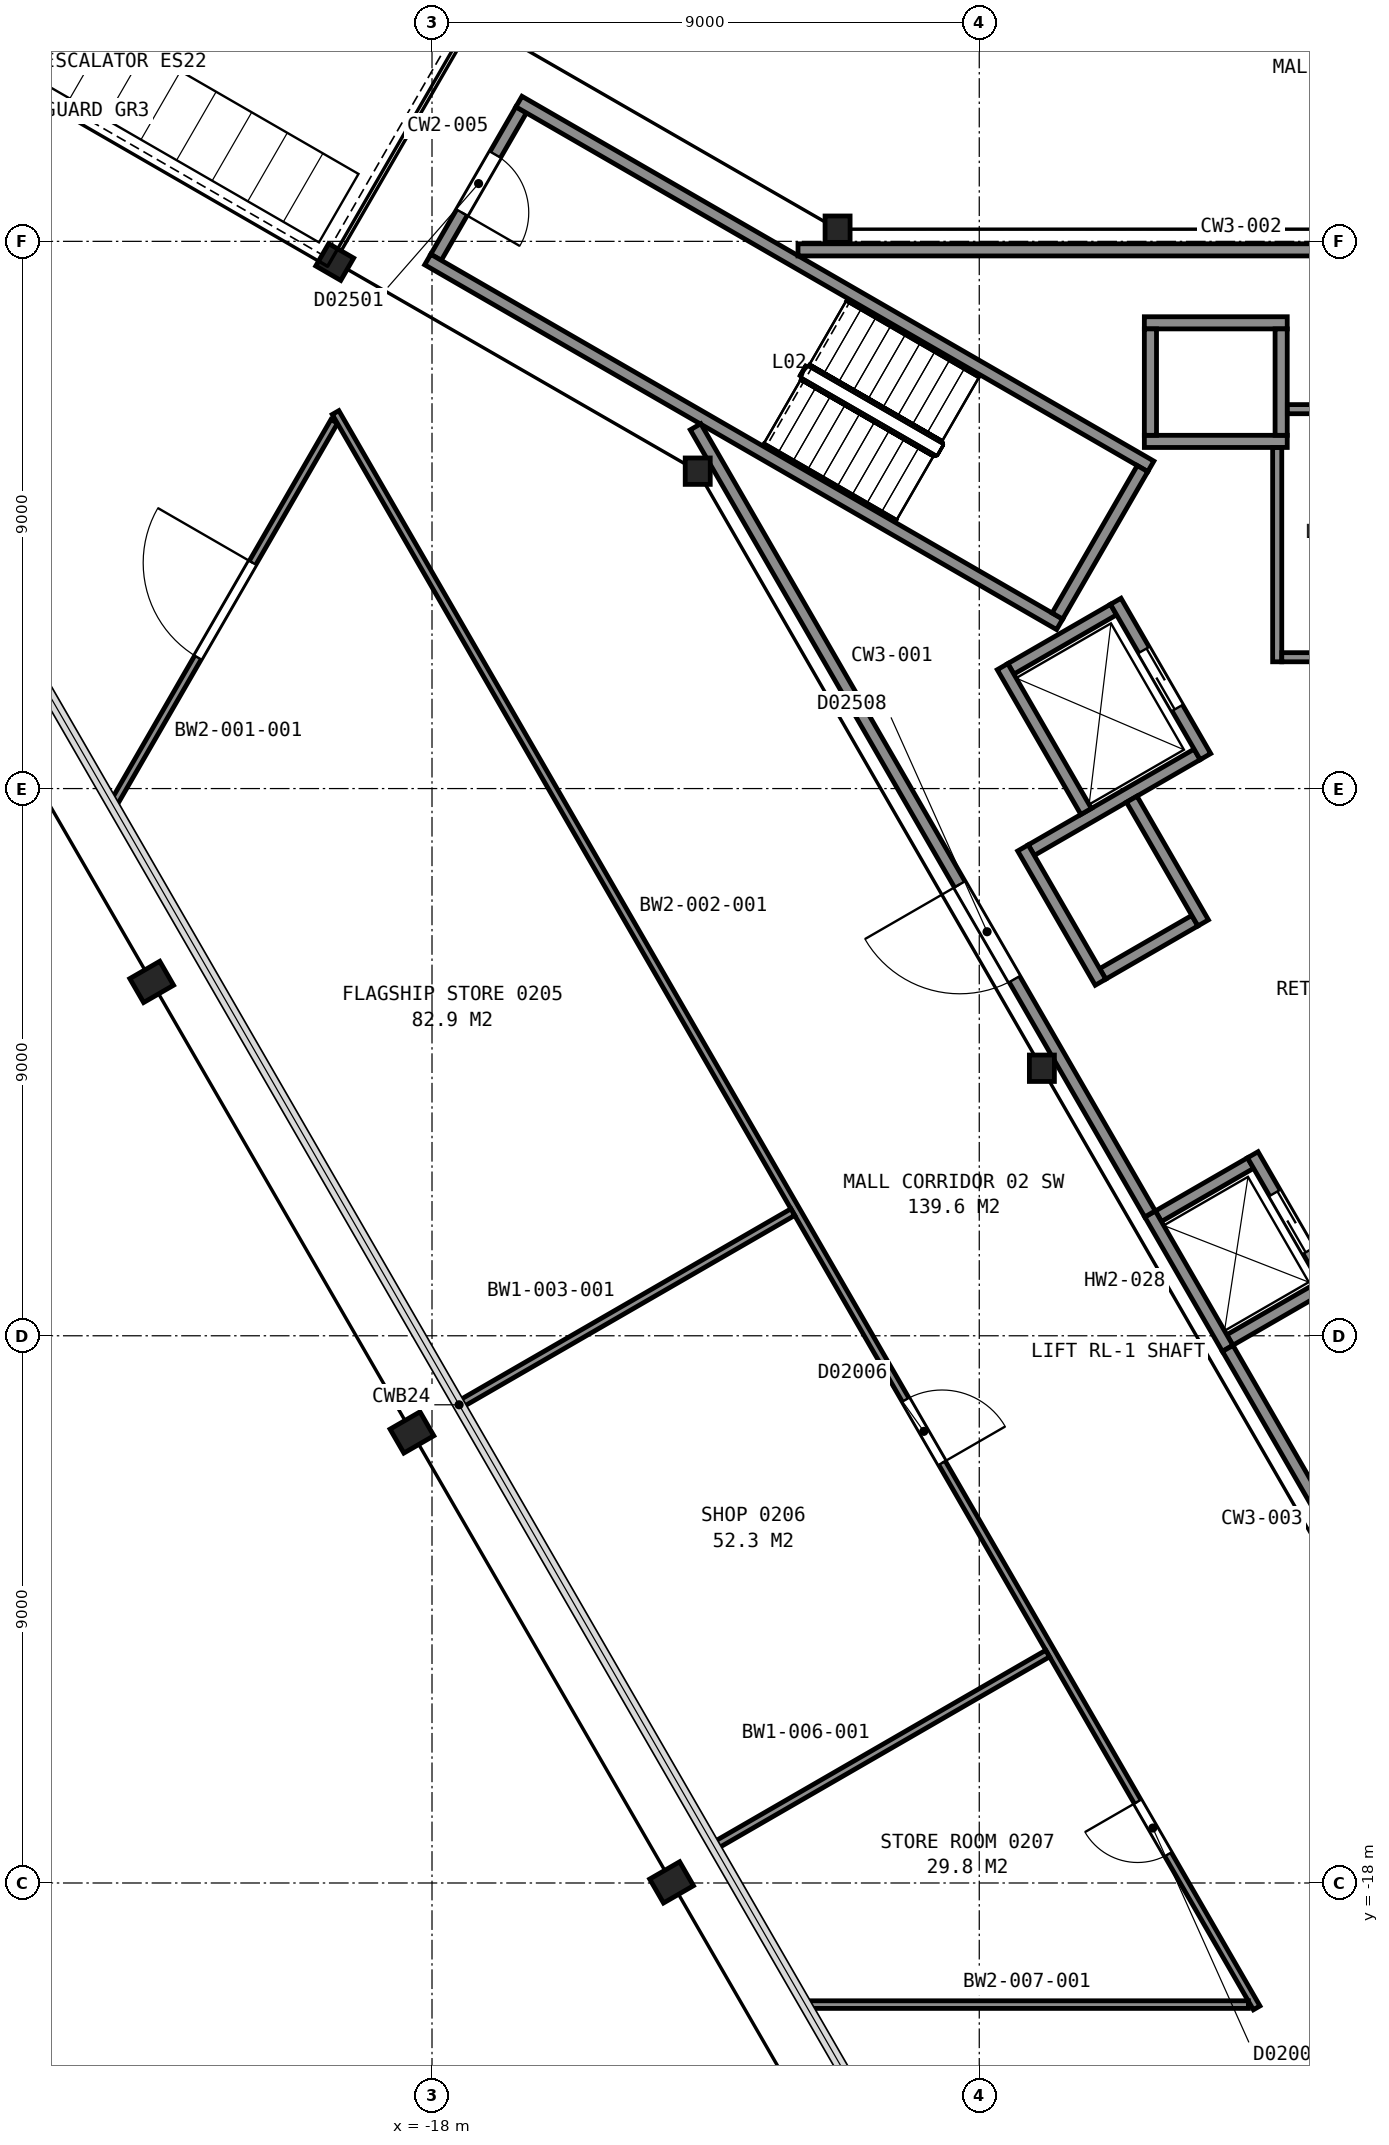
"""IFC4 building model, lengths in metres.
Left out: names, types, materials, properties, quantities, classifications, styles, units other than length and angle.
Written with IfcOpenShell. Run it as: python <this file> out.ifc"""

import sys

from ifc_helpers import new_model, si_unit, direction, frame, frame_2d, origin, origin_2d, place, context, subcontext, project, spatial, rectangle, i_section, extrude, element, fill, save


model = new_model("IFC4")
c1 = context("Model", 3, precision=1e-05, world=origin(), true_north=direction((0.0, 1.0)))
c2 = subcontext(c1, "Body", "Model", "MODEL_VIEW")
j1 = project(units=[si_unit("LENGTHUNIT", "METRE"), si_unit("PLANEANGLEUNIT", "RADIAN")], contexts=[c1])
p1 = place(None, origin())
s1 = spatial("IfcSite", under=j1, at=p1, CompositionType="ELEMENT")
p2 = place(p1, origin())
s2 = spatial("IfcBuilding", under=s1, at=p2, CompositionType="ELEMENT")
p3 = place(p2, frame((0.0, 0.0, 17.4)))
s3 = spatial("IfcBuildingStorey", under=s2, at=p3, CompositionType="ELEMENT", Elevation=17.4)
for number, where, z_axis, x_axis in (
    (1, (-22.61, -3.18, -0.16), (0.0, 0.0, 1.0), (-0.5, 0.866, 0.0)),
    (2, (-18.33, -10.59, -0.16), (0.0, 0.0, 1.0), (-0.5, 0.866, 0.0)),
    (3, (-14.06, -17.99, -0.16), (0.0, 0.0, 1.0), (-0.5, 0.866, 0.0)),
):
    element("IfcColumn", number, at=place(p3, frame(where, z_axis=z_axis, x_axis=x_axis)), inside=s3, PredefinedType="COLUMN", context=c2, shape_type="SweptSolid", body=[
        extrude(i_section(OverallWidth=0.455, OverallDepth=0.569, WebThickness=0.078, FlangeThickness=0.125, FilletRadius=0.015, at=origin_2d()), origin(), (0.0, 0.0, 1.0), 5.16),
    ])
p4 = place(p3, frame((-11.33, 9.2, 0.0), z_axis=(0.0, 0.0, 1.0), x_axis=(1.0, 0.0, 0.0)))
e4 = element("IfcColumn", 4, at=p4, inside=s3, PredefinedType="COLUMN", context=c2, shape_type="SweptSolid", body=[
    extrude(i_section(OverallWidth=0.411, OverallDepth=0.434, WebThickness=0.036, FlangeThickness=0.057, FilletRadius=0.015, at=origin_2d()), origin(), (0.0, 0.0, 1.0), 5.0),
])
p5 = place(p3, frame((-19.6, 8.66, 0.0), z_axis=(0.0, 0.0, 1.0), x_axis=(0.5, 0.866025403784, 0.0)))
e5 = element("IfcColumn", 5, at=p5, inside=s3, PredefinedType="COLUMN", context=c2, shape_type="SweptSolid", body=[
    extrude(i_section(OverallWidth=0.424, OverallDepth=0.475, WebThickness=0.048, FlangeThickness=0.077, FilletRadius=0.015, at=origin_2d()), origin(), (0.0, 0.0, 1.0), 5.0),
])
for number, where, z_axis, x_axis in (
    (6, (-13.63, 5.22, 0.0), (0.0, 0.0, 1.0), (1.0, 0.0, 0.0)),
    (7, (-7.97, -4.6, 0.0), (0.0, 0.0, 1.0), (1.0, 0.0, 0.0)),
):
    element("IfcColumn", number, at=place(p3, frame(where, z_axis=z_axis, x_axis=x_axis)), inside=s3, PredefinedType="COLUMN", context=c2, shape_type="SweptSolid", body=[
        extrude(i_section(OverallWidth=0.411, OverallDepth=0.434, WebThickness=0.036, FlangeThickness=0.057, FilletRadius=0.015, at=origin_2d()), origin(), (0.0, 0.0, 1.0), 5.0),
    ])
p6 = place(p3, frame((-16.534, 11.162, 0.0), z_axis=(0.0, 0.0, 1.0), x_axis=(-0.49998411664, -0.866034573852, 0.0)))
e8 = element("IfcWall", 8, at=p6, inside=s3, PredefinedType="PARTITIONING", context=c2, shape_type="SweptSolid", body=[
    extrude(rectangle(XDim=2.8, YDim=0.2, at=frame_2d((1.4, 0.0))), origin(), (0.0, 0.0, 1.0), 4.75),
])
p7 = place(p6, frame((0.85, 0.0, 0.0)))
e9 = element("IfcOpeningElement", 9, at=p7, cuts=e8, PredefinedType="OPENING", context=c2, shape_type="SweptSolid", body=[
    extrude(rectangle(XDim=1.1, YDim=2.1, at=frame_2d((0.55, 1.05))), frame((0.0, 0.11, 0.0), z_axis=(0.0, -1.0, 0.0), x_axis=(1.0, 0.0, 0.0)), (0.0, 0.0, 1.0), 0.22),
])
for number, where, z_axis, x_axis in (
    (10, (-7.678, 2.701, 0.0), (0.0, 0.0, 1.0), (-0.866, 0.5, 0.0)),
    (11, (-6.178, 5.299, 0.0), (0.0, 0.0, 1.0), (-0.866, 0.5, 0.0)),
):
    element("IfcWall", number, at=place(p3, frame(where, z_axis=z_axis, x_axis=x_axis)), inside=s3, PredefinedType="PARTITIONING", context=c2, shape_type="SweptSolid", body=[
        extrude(rectangle(XDim=12.0, YDim=0.2, at=frame_2d((6.0, 0.0))), origin(), (0.0, 0.0, 1.0), 4.75),
    ])
p8 = place(p3, frame((-6.315, 5.262, 0.0), z_axis=(0.0, 0.0, 1.0), x_axis=(-0.500049511043, -0.865996816683, 0.0)))
e12 = element("IfcWall", 12, at=p8, inside=s3, PredefinedType="PARTITIONING", context=c2, shape_type="SweptSolid", body=[
    extrude(rectangle(XDim=2.8, YDim=0.2, at=frame_2d((1.4, 0.0))), origin(), (0.0, 0.0, 1.0), 4.75),
])
for number, where, z_axis, x_axis in (
    (13, (-6.285, 5.71, 0.0), (0.0, 0.0, 1.0), (1.0, 0.0, 0.0)),
    (14, (-6.285, 7.66, 0.0), (0.0, 0.0, 1.0), (1.0, 0.0, 0.0)),
):
    element("IfcWall", number, at=place(p3, frame(where, z_axis=z_axis, x_axis=x_axis)), inside=s3, PredefinedType="PARTITIONING", context=c2, shape_type="SweptSolid", body=[
        extrude(rectangle(XDim=2.35, YDim=0.2, at=frame_2d((1.175, 0.0))), origin(), (0.0, 0.0, 1.0), 5.0),
    ])
for number, where, z_axis, x_axis in (
    (15, (-4.879, -9.07, 0.0), (0.0, 0.0, 1.0), (0.866, 0.5, 0.0)),
    (16, (-6.054, -7.034, 0.0), (0.0, 0.0, 1.0), (0.866, 0.5, 0.0)),
    (17, (-6.97, -3.048, 0.0), (0.0, 0.0, 1.0), (0.866, 0.5, 0.0)),
):
    element("IfcWall", number, at=place(p3, frame(where, z_axis=z_axis, x_axis=x_axis)), inside=s3, PredefinedType="PARTITIONING", context=c2, shape_type="SweptSolid", body=[
        extrude(rectangle(XDim=1.75, YDim=0.2, at=frame_2d((0.875, 0.0))), origin(), (0.0, 0.0, 1.0), 5.0),
    ])
p9 = place(p3, frame((-8.145, -1.013, 0.0), z_axis=(0.0, 0.0, 1.0), x_axis=(0.866016494683, 0.500015430699, 0.0)))
e18 = element("IfcWall", 18, at=p9, inside=s3, PredefinedType="PARTITIONING", context=c2, shape_type="SweptSolid", body=[
    extrude(rectangle(XDim=3.15, YDim=0.2, at=frame_2d((1.575, 0.0))), origin(), (0.0, 0.0, 1.0), 5.0),
])
p10 = place(p3, frame((-8.48, 1.969, 0.0), z_axis=(0.0, 0.0, 1.0), x_axis=(0.866000020948, 0.500043961785, 0.0)))
e19 = element("IfcWall", 19, at=p10, inside=s3, PredefinedType="PARTITIONING", context=c2, shape_type="SweptSolid", body=[
    extrude(rectangle(XDim=1.95, YDim=0.2, at=frame_2d((0.975, 0.0))), origin(), (0.0, 0.0, 1.0), 5.0),
])
for number, where, z_axis, x_axis in (
    (20, (-4.035, 5.81, 0.0), (0.0, 0.0, 1.0), (0.0, 1.0, 0.0)),
    (21, (-6.185, 5.81, 0.0), (0.0, 0.0, 1.0), (0.0, 1.0, 0.0)),
):
    element("IfcWall", number, at=place(p3, frame(where, z_axis=z_axis, x_axis=x_axis)), inside=s3, PredefinedType="PARTITIONING", context=c2, shape_type="SweptSolid", body=[
        extrude(rectangle(XDim=1.75, YDim=0.2, at=frame_2d((0.875, 0.0))), origin(), (0.0, 0.0, 1.0), 5.0),
    ])
p11 = place(p3, frame((-5.28, 0.525, 0.0), z_axis=(0.0, 0.0, 1.0), x_axis=(-0.500037662692, 0.866003658127, 0.0)))
e22 = element("IfcWall", 22, at=p11, inside=s3, PredefinedType="PARTITIONING", context=c2, shape_type="SweptSolid", body=[
    extrude(rectangle(XDim=2.95, YDim=0.2, at=frame_2d((1.475, 0.0))), origin(), (0.0, 0.0, 1.0), 5.0),
])
p12 = place(p11, frame((0.925, 0.0, 0.0)))
e23 = element("IfcOpeningElement", 23, at=p12, cuts=e22, PredefinedType="OPENING", context=c2, shape_type="SweptSolid", body=[
    extrude(rectangle(XDim=1.1, YDim=2.1, at=frame_2d((0.55, 1.05))), frame((0.0, 0.11, 0.0), z_axis=(0.0, -1.0, 0.0), x_axis=(1.0, 0.0, 0.0)), (0.0, 0.0, 1.0), 0.22),
])
p13 = place(p3, frame((-5.318, -2.21, 0.0), z_axis=(0.0, 0.0, 1.0), x_axis=(-0.499938297808, 0.866061024631, 0.0)))
e24 = element("IfcWall", 24, at=p13, inside=s3, PredefinedType="PARTITIONING", context=c2, shape_type="SweptSolid", body=[
    extrude(rectangle(XDim=2.35, YDim=0.2, at=frame_2d((1.175, 0.0))), origin(), (0.0, 0.0, 1.0), 5.0),
])
p14 = place(p3, frame((-7.242, -0.376, 0.0), z_axis=(0.0, 0.0, 1.0), x_axis=(-0.499996545922, 0.866027397988, 0.0)))
e25 = element("IfcWall", 25, at=p14, inside=s3, PredefinedType="PARTITIONING", context=c2, shape_type="SweptSolid", body=[
    extrude(rectangle(XDim=2.75, YDim=0.2, at=frame_2d((1.375, 0.0))), origin(), (0.0, 0.0, 1.0), 5.0),
])
p15 = place(p3, frame((-3.227, -8.231, 0.0), z_axis=(0.0, 0.0, 1.0), x_axis=(-0.499948979701, 0.866054858364, 0.0)))
e26 = element("IfcWall", 26, at=p15, inside=s3, PredefinedType="PARTITIONING", context=c2, shape_type="SweptSolid", body=[
    extrude(rectangle(XDim=2.55, YDim=0.2, at=frame_2d((1.275, 0.0))), origin(), (0.0, 0.0, 1.0), 5.0),
])
p16 = place(p15, frame((0.725, 0.0, 0.0)))
e27 = element("IfcOpeningElement", 27, at=p16, cuts=e26, PredefinedType="OPENING", context=c2, shape_type="SweptSolid", body=[
    extrude(rectangle(XDim=1.1, YDim=2.1, at=frame_2d((0.55, 1.05))), frame((0.0, 0.11, 0.0), z_axis=(0.0, -1.0, 0.0), x_axis=(1.0, 0.0, 0.0)), (0.0, 0.0, 1.0), 0.22),
])
for number, where, z_axis, x_axis in (
    (28, (-7.006, -3.185, 0.0), (0.0, 0.0, 1.0), (-0.5, 0.866, 0.0)),
    (29, (-4.916, -9.206, 0.0), (0.0, 0.0, 1.0), (-0.5, 0.866, 0.0)),
):
    element("IfcWall", number, at=place(p3, frame(where, z_axis=z_axis, x_axis=x_axis)), inside=s3, PredefinedType="PARTITIONING", context=c2, shape_type="SweptSolid", body=[
        extrude(rectangle(XDim=2.55, YDim=0.2, at=frame_2d((1.275, 0.0))), origin(), (0.0, 0.0, 1.0), 5.0),
    ])
p17 = place(p3, frame((-13.666, 5.95, 0.0), z_axis=(0.0, 0.0, 1.0), x_axis=(0.499971736997, -0.866041720822, 0.0)))
e30 = element("IfcWall", 30, at=p17, inside=s3, PredefinedType="PARTITIONING", context=c2, shape_type="SweptSolid", body=[
    extrude(rectangle(XDim=14.949, YDim=0.2, at=frame_2d((7.475, 0.0))), origin(), (0.0, 0.0, 1.0), 4.75),
])
p18 = place(p17, frame((8.69, 0.0, 0.0)))
e31 = element("IfcOpeningElement", 31, at=p18, cuts=e30, PredefinedType="OPENING", context=c2, shape_type="SweptSolid", body=[
    extrude(rectangle(XDim=1.8, YDim=2.1, at=frame_2d((0.9, 1.05))), frame((0.0, 0.11, 0.0), z_axis=(0.0, -1.0, 0.0), x_axis=(1.0, 0.0, 0.0)), (0.0, 0.0, 1.0), 0.22),
])
p19 = place(p3, frame((11.986, 8.86, 0.0), z_axis=(0.0, 0.0, 1.0), x_axis=(-1.0, 0.0, 0.0)))
e32 = element("IfcWall", 32, at=p19, inside=s3, PredefinedType="PARTITIONING", context=c2, shape_type="SweptSolid", body=[
    extrude(rectangle(XDim=23.967, YDim=0.2, at=frame_2d((11.983, 0.0))), origin(), (0.0, 0.0, 1.0), 4.75),
])
p20 = place(p19, frame((7.596, 0.0, 0.0)))
e33 = element("IfcOpeningElement", 33, at=p20, cuts=e32, PredefinedType="OPENING", context=c2, shape_type="SweptSolid", body=[
    extrude(rectangle(XDim=1.8, YDim=2.1, at=frame_2d((0.9, 1.05))), frame((0.0, 0.11, 0.0), z_axis=(0.0, -1.0, 0.0), x_axis=(1.0, 0.0, 0.0)), (0.0, 0.0, 1.0), 0.22),
])
p21 = place(p3, frame((-4.914, -9.208, 0.0), z_axis=(0.0, 0.0, 1.0), x_axis=(0.499947703927, -0.866055594831, 0.0)))
e34 = element("IfcWall", 34, at=p21, inside=s3, PredefinedType="PARTITIONING", context=c2, shape_type="SweptSolid", body=[
    extrude(rectangle(XDim=6.474, YDim=0.2, at=frame_2d((3.237, 0.0))), origin(), (0.0, 0.0, 1.0), 4.75),
])
p22 = place(p3, frame((-4.1, 2.085, 0.0), z_axis=(0.0, 0.0, 1.0), x_axis=(0.0, 1.0, 0.0)))
e35 = element("IfcWall", 35, at=p22, inside=s3, PredefinedType="PARTITIONING", context=c2, shape_type="SweptSolid", body=[
    extrude(rectangle(XDim=3.523, YDim=0.15, at=frame_2d((1.761, 0.0))), origin(), (0.0, 0.0, 1.0), 4.75),
])
p23 = place(p3, frame((-4.025, 2.16, 0.0), z_axis=(0.0, 0.0, 1.0), x_axis=(1.0, 0.0, 0.0)))
e36 = element("IfcWall", 36, at=p23, inside=s3, PredefinedType="PARTITIONING", context=c2, shape_type="SweptSolid", body=[
    extrude(rectangle(XDim=1.238, YDim=0.15, at=frame_2d((0.619, 0.0))), origin(), (0.0, 0.0, 1.0), 4.75),
])
p24 = place(p3, frame((-3.933, 6.24, 0.0), z_axis=(0.0, 0.0, 1.0), x_axis=(1.0, 0.0, 0.0)))
e37 = element("IfcWall", 37, at=p24, inside=s3, PredefinedType="PARTITIONING", context=c2, shape_type="SweptSolid", body=[
    extrude(rectangle(XDim=3.538, YDim=0.15, at=frame_2d((1.769, 0.0))), origin(), (0.0, 0.0, 1.0), 4.75),
])
p25 = place(p24, frame((0.4, 0.0, 0.0)))
e38 = element("IfcOpeningElement", 38, at=p25, cuts=e37, PredefinedType="OPENING", context=c2, shape_type="SweptSolid", body=[
    extrude(rectangle(XDim=1.0, YDim=2.1, at=frame_2d((0.5, 1.05))), frame((0.0, 0.085, 0.0), z_axis=(0.0, -1.0, 0.0), x_axis=(1.0, 0.0, 0.0)), (0.0, 0.0, 1.0), 0.17),
])
p26 = place(p3, frame((-19.607, 6.039, 0.0), z_axis=(0.0, 0.0, 1.0), x_axis=(-0.500002873931, -0.866023744513, 0.0)))
e39 = element("IfcWall", 39, at=p26, inside=s3, PredefinedType="PARTITIONING", context=c2, shape_type="SweptSolid", body=[
    extrude(rectangle(XDim=7.285, YDim=0.125, at=frame_2d((3.643, 0.0))), origin(), (0.0, 0.0, 1.0), 4.84),
])
p27 = place(p26, frame((2.685, 0.0, 0.0)))
e40 = element("IfcOpeningElement", 40, at=p27, cuts=e39, PredefinedType="OPENING", context=c2, shape_type="SweptSolid", body=[
    extrude(rectangle(XDim=1.8, YDim=2.4, at=frame_2d((0.9, 1.2))), frame((0.0, 0.073, 0.0), z_axis=(0.0, -1.0, 0.0), x_axis=(1.0, 0.0, 0.0)), (0.0, 0.0, 1.0), 0.145),
])
p28 = place(p3, frame((-4.438, -20.054, 0.0), z_axis=(0.0, 0.0, 1.0), x_axis=(-0.499994028088, 0.866028851642, 0.0)))
e41 = element("IfcWall", 41, at=p28, inside=s3, PredefinedType="PARTITIONING", context=c2, shape_type="SweptSolid", body=[
    extrude(rectangle(XDim=30.297, YDim=0.125, at=frame_2d((15.148, 0.0))), origin(), (0.0, 0.0, 1.0), 3.853),
])
p29 = place(p28, frame((10.349, 0.0, 0.0)))
e42 = element("IfcOpeningElement", 42, at=p29, cuts=e41, PredefinedType="OPENING", context=c2, shape_type="SweptSolid", body=[
    extrude(rectangle(XDim=1.2, YDim=2.1, at=frame_2d((0.6, 1.05))), frame((0.0, 0.073, 0.0), z_axis=(0.0, -1.0, 0.0), x_axis=(1.0, 0.0, 0.0)), (0.0, 0.0, 1.0), 0.145),
])
p30 = place(p28, frame((2.916, 0.0, 0.0)))
e43 = element("IfcOpeningElement", 43, at=p30, cuts=e41, PredefinedType="OPENING", context=c2, shape_type="SweptSolid", body=[
    extrude(rectangle(XDim=1.0, YDim=2.1, at=frame_2d((0.5, 1.05))), frame((0.0, 0.073, 0.0), z_axis=(0.0, -1.0, 0.0), x_axis=(1.0, 0.0, 0.0)), (0.0, 0.0, 1.0), 0.145),
])
for number, where, z_axis, x_axis in (
    (44, (-17.554, -10.135, 0.0), (0.0, 0.0, 1.0), (0.866, 0.5, 0.0)),
    (45, (-13.363, -17.395, 0.0), (0.0, 0.0, 1.0), (0.866, 0.5, 0.0)),
):
    element("IfcWall", number, at=place(p3, frame(where, z_axis=z_axis, x_axis=x_axis)), inside=s3, PredefinedType="PARTITIONING", context=c2, shape_type="SweptSolid", body=[
        extrude(rectangle(XDim=6.337, YDim=0.125, at=frame_2d((3.168, 0.0))), origin(), (0.0, 0.0, 1.0), 3.853),
    ])
p31 = place(p3, frame((-11.859, -20.0, 0.0), z_axis=(0.0, 0.0, 1.0), x_axis=(1.0, 0.0, 0.0)))
e46 = element("IfcWall", 46, at=p31, inside=s3, PredefinedType="PARTITIONING", context=c2, shape_type="SweptSolid", body=[
    extrude(rectangle(XDim=7.285, YDim=0.125, at=frame_2d((3.643, 0.0))), origin(), (0.0, 0.0, 1.0), 4.84),
])
p32 = place(p7, origin())
e47 = element("IfcDoor", 47, at=p32, inside=s3, OperationType="SINGLE_SWING_RIGHT", PredefinedType="DOOR", context=c2, shape_type="SweptSolid", body=[
    extrude(rectangle(XDim=1.1, YDim=2.1, at=frame_2d((0.55, 1.05))), frame((0.0, 0.025, 0.0), z_axis=(0.0, -1.0, 0.0), x_axis=(1.0, 0.0, 0.0)), (0.0, 0.0, 1.0), 0.05),
])
fill(e9, e47)
p33 = place(p12, origin())
e48 = element("IfcDoor", 48, at=p33, inside=s3, OperationType="SLIDING_TO_LEFT", PredefinedType="DOOR", context=c2, shape_type="SweptSolid", body=[
    extrude(rectangle(XDim=1.1, YDim=2.1, at=frame_2d((0.55, 1.05))), frame((0.0, 0.025, 0.0), z_axis=(0.0, -1.0, 0.0), x_axis=(1.0, 0.0, 0.0)), (0.0, 0.0, 1.0), 0.05),
])
fill(e23, e48)
p34 = place(p16, origin())
e49 = element("IfcDoor", 49, at=p34, inside=s3, OperationType="SLIDING_TO_LEFT", PredefinedType="DOOR", context=c2, shape_type="SweptSolid", body=[
    extrude(rectangle(XDim=1.1, YDim=2.1, at=frame_2d((0.55, 1.05))), frame((0.0, 0.025, 0.0), z_axis=(0.0, -1.0, 0.0), x_axis=(1.0, 0.0, 0.0)), (0.0, 0.0, 1.0), 0.05),
])
fill(e27, e49)
p35 = place(p18, origin())
e50 = element("IfcDoor", 50, at=p35, inside=s3, OperationType="DOUBLE_DOOR_SINGLE_SWING", PredefinedType="DOOR", context=c2, shape_type="SweptSolid", body=[
    extrude(rectangle(XDim=1.8, YDim=2.1, at=frame_2d((0.9, 1.05))), frame((0.0, 0.025, 0.0), z_axis=(0.0, -1.0, 0.0), x_axis=(1.0, 0.0, 0.0)), (0.0, 0.0, 1.0), 0.05),
])
fill(e31, e50)
p36 = place(p27, origin())
e51 = element("IfcDoor", 51, at=p36, inside=s3, OperationType="DOUBLE_DOOR_SINGLE_SWING", PredefinedType="DOOR", context=c2, shape_type="SweptSolid", body=[
    extrude(rectangle(XDim=1.8, YDim=2.4, at=frame_2d((0.9, 1.2))), frame((0.0, 0.025, 0.0), z_axis=(0.0, -1.0, 0.0), x_axis=(1.0, 0.0, 0.0)), (0.0, 0.0, 1.0), 0.05),
])
fill(e40, e51)
p37 = place(p29, origin())
e52 = element("IfcDoor", 52, at=p37, inside=s3, OperationType="SINGLE_SWING_LEFT", PredefinedType="DOOR", context=c2, shape_type="SweptSolid", body=[
    extrude(rectangle(XDim=1.2, YDim=2.1, at=frame_2d((0.6, 1.05))), frame((0.0, 0.025, 0.0), z_axis=(0.0, -1.0, 0.0), x_axis=(1.0, 0.0, 0.0)), (0.0, 0.0, 1.0), 0.05),
])
fill(e42, e52)
p38 = place(p30, origin())
e53 = element("IfcDoor", 53, at=p38, inside=s3, OperationType="SINGLE_SWING_RIGHT", PredefinedType="DOOR", context=c2, shape_type="SweptSolid", body=[
    extrude(rectangle(XDim=1.0, YDim=2.1, at=frame_2d((0.5, 1.05))), frame((0.0, 0.025, 0.0), z_axis=(0.0, -1.0, 0.0), x_axis=(1.0, 0.0, 0.0)), (0.0, 0.0, 1.0), 0.05),
])
fill(e43, e53)
save(model, sys.argv[1])
